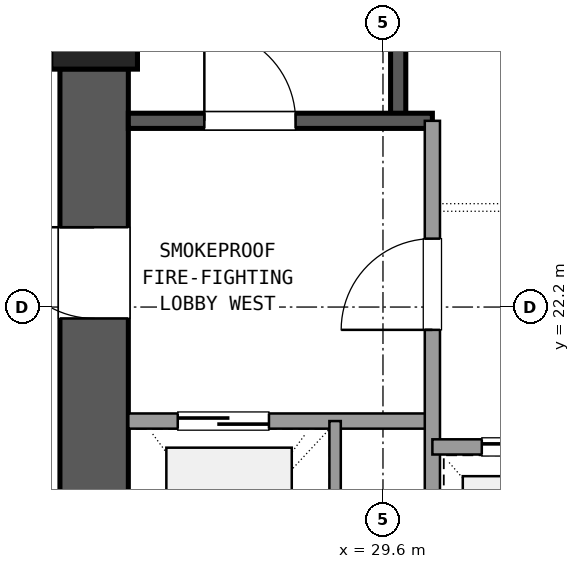
"""IFC4 building model, lengths in metres.
Left out: names, types, materials, properties, quantities, classifications, styles, units other than length and angle.
Written with IfcOpenShell. Run it as: python <this file> out.ifc"""

import sys

from ifc_helpers import new_model, si_unit, direction, frame, frame_2d, origin, origin_2d, place, context, subcontext, project, spatial, rectangle, extrude, element, fill, save


model = new_model("IFC4")
c1 = context("Model", 3, precision=1e-05, world=origin(), true_north=direction((0.0, 1.0)))
c2 = subcontext(c1, "Body", "Model", "MODEL_VIEW")
j1 = project(units=[si_unit("LENGTHUNIT", "METRE"), si_unit("PLANEANGLEUNIT", "RADIAN")], contexts=[c1])
p1 = place(None, origin())
s1 = spatial("IfcSite", under=j1, at=p1, CompositionType="ELEMENT")
p2 = place(p1, origin())
s2 = spatial("IfcBuilding", under=s1, at=p2, CompositionType="ELEMENT")
p3 = place(p2, frame((0.0, 0.0, 38.34)))
s3 = spatial("IfcBuildingStorey", under=s2, at=p3, CompositionType="ELEMENT", Elevation=38.34)
p4 = place(p3, frame((25.8, 25.9, 0.0), z_axis=(0.0, 0.0, 1.0), x_axis=(1.0, 0.0, 0.0)))
e1 = element("IfcColumn", 1, at=p4, inside=s3, PredefinedType="COLUMN", context=c2, shape_type="SweptSolid", body=[
    extrude(rectangle(XDim=1.14, YDim=1.14, at=origin_2d()), origin(), (0.0, 0.0, 1.0), 3.6),
])
p5 = place(p3, frame((25.8, 25.335, 0.0), z_axis=(0.0, 0.0, 1.0), x_axis=(0.0, -1.0, 0.0)))
e2 = element("IfcWall", 2, at=p5, inside=s3, PredefinedType="SHEAR", context=c2, shape_type="SweptSolid", body=[
    extrude(rectangle(XDim=7.47, YDim=0.9, at=frame_2d((3.735, 0.0))), origin(), (0.0, 0.0, 1.0), 3.32),
])
p6 = place(p5, frame((2.085, 0.0, 0.0)))
e3 = element("IfcOpeningElement", 3, at=p6, cuts=e2, PredefinedType="OPENING", context=c2, shape_type="SweptSolid", body=[
    extrude(rectangle(XDim=1.2, YDim=2.15, at=frame_2d((0.6, 1.075))), frame((0.0, 0.46, 0.0), z_axis=(0.0, -1.0, 0.0), x_axis=(1.0, 0.0, 0.0)), (0.0, 0.0, 1.0), 0.92),
])
p7 = place(p3, frame((29.8, 24.65, 0.0), z_axis=(0.0, 0.0, 1.0), x_axis=(0.0, 1.0, 0.0)))
e4 = element("IfcWall", 4, at=p7, inside=s3, PredefinedType="SHEAR", context=c2, shape_type="SweptSolid", body=[
    extrude(rectangle(XDim=9.4, YDim=0.2, at=frame_2d((4.7, 0.0))), origin(), (0.0, 0.0, 1.0), 3.32),
])
p8 = place(p3, frame((26.25, 24.65, 0.0), z_axis=(0.0, 0.0, 1.0), x_axis=(1.0, 0.0, 0.0)))
e5 = element("IfcWall", 5, at=p8, inside=s3, PredefinedType="SHEAR", context=c2, shape_type="SweptSolid", body=[
    extrude(rectangle(XDim=4.0, YDim=0.2, at=frame_2d((2.0, 0.0))), origin(), (0.0, 0.0, 1.0), 3.32),
])
p9 = place(p8, frame((1.0, 0.0, 0.0)))
e6 = element("IfcOpeningElement", 6, at=p9, cuts=e5, PredefinedType="OPENING", context=c2, shape_type="SweptSolid", body=[
    extrude(rectangle(XDim=1.2, YDim=2.15, at=frame_2d((0.6, 1.075))), frame((0.0, 0.11, 0.0), z_axis=(0.0, -1.0, 0.0), x_axis=(1.0, 0.0, 0.0)), (0.0, 0.0, 1.0), 0.22),
])
p10 = place(p3, frame((26.25, 20.7, 0.0), z_axis=(0.0, 0.0, 1.0), x_axis=(1.0, 0.0, 0.0)))
e7 = element("IfcWall", 7, at=p10, inside=s3, PredefinedType="SOLIDWALL", context=c2, shape_type="SweptSolid", body=[
    extrude(rectangle(XDim=4.0, YDim=0.2, at=frame_2d((2.0, 0.0))), origin(), (0.0, 0.0, 1.0), 2.61),
])
p11 = place(p10, frame((0.65, 0.0, 0.0)))
e8 = element("IfcOpeningElement", 8, at=p11, cuts=e7, PredefinedType="OPENING", context=c2, shape_type="SweptSolid", body=[
    extrude(rectangle(XDim=1.2, YDim=2.15, at=frame_2d((0.6, 1.075))), frame((0.0, 0.11, 0.0), z_axis=(0.0, -1.0, 0.0), x_axis=(1.0, 0.0, 0.0)), (0.0, 0.0, 1.0), 0.22),
])
p12 = place(p3, frame((30.25, 17.75, 0.0), z_axis=(0.0, 0.0, 1.0), x_axis=(0.0, 1.0, 0.0)))
e9 = element("IfcWall", 9, at=p12, inside=s3, PredefinedType="SOLIDWALL", context=c2, shape_type="SweptSolid", body=[
    extrude(rectangle(XDim=6.9, YDim=0.2, at=frame_2d((3.45, 0.0))), origin(), (0.0, 0.0, 1.0), 2.61),
])
p13 = place(p12, frame((4.15, 0.0, 0.0)))
e10 = element("IfcOpeningElement", 10, at=p13, cuts=e9, PredefinedType="OPENING", context=c2, shape_type="SweptSolid", body=[
    extrude(rectangle(XDim=1.2, YDim=2.15, at=frame_2d((0.6, 1.075))), frame((0.0, 0.11, 0.0), z_axis=(0.0, -1.0, 0.0), x_axis=(1.0, 0.0, 0.0)), (0.0, 0.0, 1.0), 0.22),
])
p14 = place(p3, frame((28.97, 17.75, 0.0), z_axis=(0.0, 0.0, 1.0), x_axis=(0.0, 1.0, 0.0)))
e11 = element("IfcWall", 11, at=p14, inside=s3, PredefinedType="PARTITIONING", context=c2, shape_type="SweptSolid", body=[
    extrude(rectangle(XDim=2.95, YDim=0.15, at=frame_2d((1.475, 0.0))), origin(), (0.0, 0.0, 1.0), 2.61),
])
p15 = place(p3, frame((30.25, 20.36, 0.0), z_axis=(0.0, 0.0, 1.0), x_axis=(1.0, 0.0, 0.0)))
e12 = element("IfcWall", 12, at=p15, inside=s3, PredefinedType="SOLIDWALL", context=c2, shape_type="SweptSolid", body=[
    extrude(rectangle(XDim=7.0, YDim=0.2, at=frame_2d((3.5, 0.0))), origin(), (0.0, 0.0, 1.0), 2.61),
])
p16 = place(p15, frame((0.65, 0.0, 0.0)))
e13 = element("IfcOpeningElement", 13, at=p16, cuts=e12, PredefinedType="OPENING", context=c2, shape_type="SweptSolid", body=[
    extrude(rectangle(XDim=1.1, YDim=2.15, at=frame_2d((0.55, 1.075))), frame((0.0, 0.11, 0.0), z_axis=(0.0, -1.0, 0.0), x_axis=(1.0, 0.0, 0.0)), (0.0, 0.0, 1.0), 0.22),
])
p17 = place(p15, frame((2.95, 0.0, 0.0)))
e14 = element("IfcOpeningElement", 14, at=p17, cuts=e12, PredefinedType="OPENING", context=c2, shape_type="SweptSolid", body=[
    extrude(rectangle(XDim=1.1, YDim=2.15, at=frame_2d((0.55, 1.075))), frame((0.0, 0.11, 0.0), z_axis=(0.0, -1.0, 0.0), x_axis=(1.0, 0.0, 0.0)), (0.0, 0.0, 1.0), 0.22),
])
p18 = place(p15, frame((5.25, 0.0, 0.0)))
e15 = element("IfcOpeningElement", 15, at=p18, cuts=e12, PredefinedType="OPENING", context=c2, shape_type="SweptSolid", body=[
    extrude(rectangle(XDim=1.1, YDim=2.15, at=frame_2d((0.55, 1.075))), frame((0.0, 0.11, 0.0), z_axis=(0.0, -1.0, 0.0), x_axis=(1.0, 0.0, 0.0)), (0.0, 0.0, 1.0), 0.22),
])
p19 = place(p9, origin())
e16 = element("IfcDoor", 16, at=p19, inside=s3, OperationType="SINGLE_SWING_LEFT", PredefinedType="DOOR", context=c2, shape_type="SweptSolid", body=[
    extrude(rectangle(XDim=1.2, YDim=2.15, at=frame_2d((0.6, 1.075))), frame((0.0, 0.025, 0.0), z_axis=(0.0, -1.0, 0.0), x_axis=(1.0, 0.0, 0.0)), (0.0, 0.0, 1.0), 0.05),
])
fill(e6, e16)
p20 = place(p11, origin())
e17 = element("IfcDoor", 17, at=p20, inside=s3, OperationType="SLIDING_TO_LEFT", PredefinedType="DOOR", context=c2, shape_type="SweptSolid", body=[
    extrude(rectangle(XDim=1.2, YDim=2.15, at=frame_2d((0.6, 1.075))), frame((0.0, 0.025, 0.0), z_axis=(0.0, -1.0, 0.0), x_axis=(1.0, 0.0, 0.0)), (0.0, 0.0, 1.0), 0.05),
])
fill(e8, e17)
p21 = place(p13, origin())
e18 = element("IfcDoor", 18, at=p21, inside=s3, OperationType="SINGLE_SWING_LEFT", PredefinedType="DOOR", context=c2, shape_type="SweptSolid", body=[
    extrude(rectangle(XDim=1.2, YDim=2.15, at=frame_2d((0.6, 1.075))), frame((0.0, 0.025, 0.0), z_axis=(0.0, -1.0, 0.0), x_axis=(1.0, 0.0, 0.0)), (0.0, 0.0, 1.0), 0.05),
])
fill(e10, e18)
p22 = place(p6, frame((1.2, 0.0, 0.0), z_axis=(0.0, 0.0, 1.0), x_axis=(-1.0, 0.0, 0.0)))
e19 = element("IfcDoor", 19, at=p22, inside=s3, OperationType="SINGLE_SWING_LEFT", PredefinedType="DOOR", context=c2, shape_type="SweptSolid", body=[
    extrude(rectangle(XDim=1.2, YDim=2.15, at=frame_2d((0.6, 1.075))), frame((0.0, 0.025, 0.0), z_axis=(0.0, -1.0, 0.0), x_axis=(1.0, 0.0, 0.0)), (0.0, 0.0, 1.0), 0.05),
])
fill(e3, e19)
p23 = place(p16, origin())
e20 = element("IfcDoor", 20, at=p23, inside=s3, OperationType="SLIDING_TO_LEFT", PredefinedType="DOOR", context=c2, shape_type="SweptSolid", body=[
    extrude(rectangle(XDim=1.1, YDim=2.15, at=frame_2d((0.55, 1.075))), frame((0.0, 0.025, 0.0), z_axis=(0.0, -1.0, 0.0), x_axis=(1.0, 0.0, 0.0)), (0.0, 0.0, 1.0), 0.05),
])
fill(e13, e20)
save(model, sys.argv[1])
